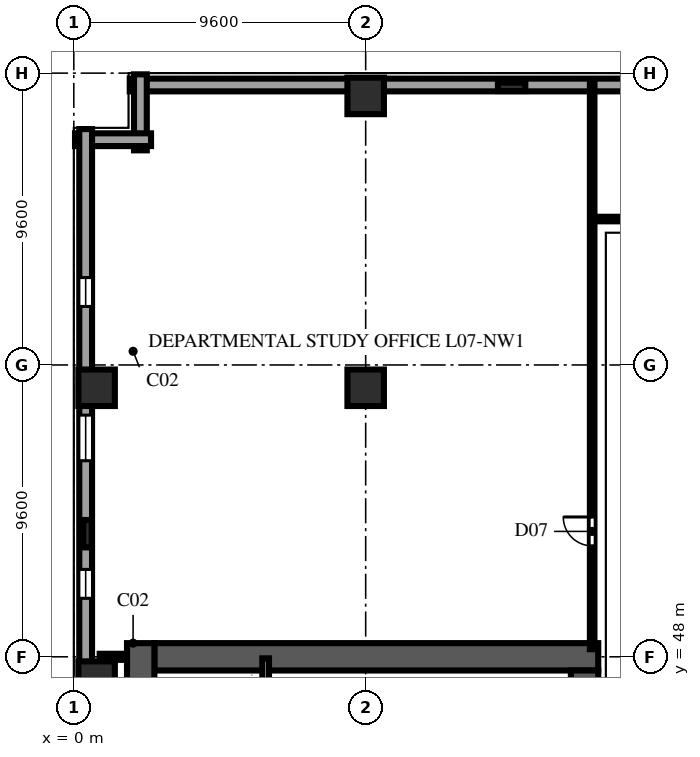
"""IFC4 building model, lengths in metres.
Left out: names, types, materials, properties, quantities, classifications, styles, units other than length and angle.
Written with IfcOpenShell. Run it as: python <this file> out.ifc"""

import sys

from ifc_helpers import new_model, si_unit, direction, frame, frame_2d, origin, origin_2d, place, context, subcontext, project, spatial, rectangle, extrude, element, fill, save


model = new_model("IFC4")
c1 = context("Model", 3, precision=1e-05, world=origin(), true_north=direction((0.0, 1.0)))
c2 = subcontext(c1, "Body", "Model", "MODEL_VIEW")
j1 = project(units=[si_unit("LENGTHUNIT", "METRE"), si_unit("PLANEANGLEUNIT", "RADIAN")], contexts=[c1])
p1 = place(None, origin())
s1 = spatial("IfcSite", under=j1, at=p1, CompositionType="ELEMENT")
p2 = place(p1, origin())
s2 = spatial("IfcBuilding", under=s1, at=p2, CompositionType="ELEMENT")
p3 = place(p2, frame((0.0, 0.0, 31.8)))
s3 = spatial("IfcBuildingStorey", under=s2, at=p3, CompositionType="ELEMENT", Elevation=31.8)
p4 = place(p3, frame((2.65, 48.0, 0.0), z_axis=(0.0, 0.0, 1.0), x_axis=(1.0, 0.0, 0.0)))
e1 = element("IfcWall", 1, at=p4, inside=s3, PredefinedType="SHEAR", context=c2, shape_type="SweptSolid", body=[
    extrude(rectangle(XDim=14.6, YDim=0.9, at=frame_2d((7.3, 0.0))), origin(), (0.0, 0.0, 1.0), 3.54),
])
p5 = place(p3, frame((2.2, 9.15, 0.0), z_axis=(0.0, 0.0, 1.0), x_axis=(0.0, 1.0, 0.0)))
e2 = element("IfcWall", 2, at=p5, inside=s3, PredefinedType="SHEAR", context=c2, shape_type="SweptSolid", body=[
    extrude(rectangle(XDim=39.3, YDim=0.9, at=frame_2d((19.65, 0.0))), origin(), (0.0, 0.0, 1.0), 3.54),
])
p6 = place(p3, frame((16.8, 36.4, 0.0), z_axis=(0.0, 0.0, 1.0), x_axis=(0.0, 1.0, 0.0)))
e3 = element("IfcWall", 3, at=p6, inside=s3, PredefinedType="SHEAR", context=c2, shape_type="SweptSolid", body=[
    extrude(rectangle(XDim=11.15, YDim=0.9, at=frame_2d((5.575, 0.0))), origin(), (0.0, 0.0, 1.0), 3.54),
])
p7 = place(p6, frame((9.2, 0.0, 0.0)))
e4 = element("IfcOpeningElement", 4, at=p7, cuts=e3, PredefinedType="OPENING", context=c2, shape_type="SweptSolid", body=[
    extrude(rectangle(XDim=0.95, YDim=2.15, at=frame_2d((0.475, 1.075))), frame((0.0, 0.462, 0.0), z_axis=(0.0, -1.0, 0.0), x_axis=(1.0, 0.0, 0.0)), (0.0, 0.0, 1.0), 0.924),
])
for number, where, z_axis, x_axis in (
    (5, (0.75, 47.25, 0.0), (0.0, 0.0, 1.0), (1.0, 0.0, 0.0)),
    (6, (0.75, 56.85, 0.0), (0.0, 0.0, 1.0), (1.0, 0.0, 0.0)),
    (7, (9.6, 56.85, 0.0), (0.0, 0.0, 1.0), (1.0, 0.0, 0.0)),
    (8, (9.6, 66.45, 0.0), (0.0, 0.0, 1.0), (1.0, 0.0, 0.0)),
):
    element("IfcColumn", number, at=place(p3, frame(where, z_axis=z_axis, x_axis=x_axis)), inside=s3, PredefinedType="COLUMN", context=c2, shape_type="SweptSolid", body=[
        extrude(rectangle(XDim=1.2, YDim=1.2, at=origin_2d()), origin(), (0.0, 0.0, 1.0), 3.8),
    ])
for number, where, z_axis, x_axis in (
    (9, (0.45, 52.05, 0.0), (0.0, 0.0, 1.0), (0.0, 1.0, 0.0)),
    (10, (14.4, 66.75, 0.0), (0.0, 0.0, 1.0), (1.0, 0.0, 0.0)),
):
    element("IfcColumn", number, at=place(p3, frame(where, z_axis=z_axis, x_axis=x_axis)), inside=s3, PredefinedType="PILASTER", context=c2, shape_type="SweptSolid", body=[
        extrude(rectangle(XDim=0.9, YDim=0.28, at=origin_2d()), origin(), (0.0, 0.0, 1.0), 3.8),
    ])
p8 = place(p3, frame((36.56, 66.81, 0.0), z_axis=(0.0, 0.0, 1.0), x_axis=(-1.0, 0.0, 0.0)))
e11 = element("IfcWall", 11, at=p8, inside=s3, PredefinedType="SOLIDWALL", context=c2, shape_type="SweptSolid", body=[
    extrude(rectangle(XDim=34.72, YDim=0.42, at=frame_2d((17.36, 0.0))), origin(), (0.0, 0.0, 1.0), 3.54),
])
p9 = place(p8, frame((4.885, 0.0, 0.9)))
e12 = element("IfcOpeningElement", 12, at=p9, cuts=e11, PredefinedType="OPENING", context=c2, shape_type="SweptSolid", body=[
    extrude(rectangle(XDim=0.95, YDim=1.85, at=frame_2d((0.475, 0.925))), frame((0.0, 0.222, 0.0), z_axis=(0.0, -1.0, 0.0), x_axis=(1.0, 0.0, 0.0)), (0.0, 0.0, 1.0), 0.444),
])
p10 = place(p8, frame((9.41, 0.0, 0.9)))
e13 = element("IfcOpeningElement", 13, at=p10, cuts=e11, PredefinedType="OPENING", context=c2, shape_type="SweptSolid", body=[
    extrude(rectangle(XDim=1.5, YDim=1.85, at=frame_2d((0.75, 0.925))), frame((0.0, 0.222, 0.0), z_axis=(0.0, -1.0, 0.0), x_axis=(1.0, 0.0, 0.0)), (0.0, 0.0, 1.0), 0.444),
])
p11 = place(p8, frame((14.485, 0.0, 0.9)))
e14 = element("IfcOpeningElement", 14, at=p11, cuts=e11, PredefinedType="OPENING", context=c2, shape_type="SweptSolid", body=[
    extrude(rectangle(XDim=0.95, YDim=1.85, at=frame_2d((0.475, 0.925))), frame((0.0, 0.222, 0.0), z_axis=(0.0, -1.0, 0.0), x_axis=(1.0, 0.0, 0.0)), (0.0, 0.0, 1.0), 0.444),
])
for number, where, z_axis, x_axis in (
    (15, (2.19, 67.16, 0.0), (0.0, 0.0, 1.0), (0.0, -1.0, 0.0)),
    (16, (2.54, 65.01, 0.0), (0.0, 0.0, 1.0), (-1.0, 0.0, 0.0)),
):
    element("IfcWall", number, at=place(p3, frame(where, z_axis=z_axis, x_axis=x_axis)), inside=s3, PredefinedType="SOLIDWALL", context=c2, shape_type="SweptSolid", body=[
        extrude(rectangle(XDim=2.5, YDim=0.42, at=frame_2d((1.25, 0.0))), origin(), (0.0, 0.0, 1.0), 3.54),
    ])
p12 = place(p3, frame((0.39, 65.36, 0.0), z_axis=(0.0, 0.0, 1.0), x_axis=(0.0, -1.0, 0.0)))
e17 = element("IfcWall", 17, at=p12, inside=s3, PredefinedType="SOLIDWALL", context=c2, shape_type="SweptSolid", body=[
    extrude(rectangle(XDim=63.52, YDim=0.42, at=frame_2d((31.76, 0.0))), origin(), (0.0, 0.0, 1.0), 3.54),
])
p13 = place(p12, frame((4.885, 0.0, 0.9)))
e18 = element("IfcOpeningElement", 18, at=p13, cuts=e17, PredefinedType="OPENING", context=c2, shape_type="SweptSolid", body=[
    extrude(rectangle(XDim=0.95, YDim=1.85, at=frame_2d((0.475, 0.925))), frame((0.0, 0.222, 0.0), z_axis=(0.0, -1.0, 0.0), x_axis=(1.0, 0.0, 0.0)), (0.0, 0.0, 1.0), 0.444),
])
p14 = place(p12, frame((9.41, 0.0, 0.9)))
e19 = element("IfcOpeningElement", 19, at=p14, cuts=e17, PredefinedType="OPENING", context=c2, shape_type="SweptSolid", body=[
    extrude(rectangle(XDim=1.5, YDim=1.85, at=frame_2d((0.75, 0.925))), frame((0.0, 0.222, 0.0), z_axis=(0.0, -1.0, 0.0), x_axis=(1.0, 0.0, 0.0)), (0.0, 0.0, 1.0), 0.444),
])
p15 = place(p12, frame((14.485, 0.0, 0.9)))
e20 = element("IfcOpeningElement", 20, at=p15, cuts=e17, PredefinedType="OPENING", context=c2, shape_type="SweptSolid", body=[
    extrude(rectangle(XDim=0.95, YDim=1.85, at=frame_2d((0.475, 0.925))), frame((0.0, 0.222, 0.0), z_axis=(0.0, -1.0, 0.0), x_axis=(1.0, 0.0, 0.0)), (0.0, 0.0, 1.0), 0.444),
])
p16 = place(p12, frame((19.01, 0.0, 0.9)))
e21 = element("IfcOpeningElement", 21, at=p16, cuts=e17, PredefinedType="OPENING", context=c2, shape_type="SweptSolid", body=[
    extrude(rectangle(XDim=1.5, YDim=1.85, at=frame_2d((0.75, 0.925))), frame((0.0, 0.222, 0.0), z_axis=(0.0, -1.0, 0.0), x_axis=(1.0, 0.0, 0.0)), (0.0, 0.0, 1.0), 0.444),
])
p17 = place(p12, frame((24.085, 0.0, 0.9)))
e22 = element("IfcOpeningElement", 22, at=p17, cuts=e17, PredefinedType="OPENING", context=c2, shape_type="SweptSolid", body=[
    extrude(rectangle(XDim=0.95, YDim=1.85, at=frame_2d((0.475, 0.925))), frame((0.0, 0.222, 0.0), z_axis=(0.0, -1.0, 0.0), x_axis=(1.0, 0.0, 0.0)), (0.0, 0.0, 1.0), 0.444),
])
p18 = place(p12, frame((28.61, 0.0, 0.9)))
e23 = element("IfcOpeningElement", 23, at=p18, cuts=e17, PredefinedType="OPENING", context=c2, shape_type="SweptSolid", body=[
    extrude(rectangle(XDim=1.5, YDim=1.85, at=frame_2d((0.75, 0.925))), frame((0.0, 0.222, 0.0), z_axis=(0.0, -1.0, 0.0), x_axis=(1.0, 0.0, 0.0)), (0.0, 0.0, 1.0), 0.444),
])
p19 = place(p12, frame((33.685, 0.0, 0.9)))
e24 = element("IfcOpeningElement", 24, at=p19, cuts=e17, PredefinedType="OPENING", context=c2, shape_type="SweptSolid", body=[
    extrude(rectangle(XDim=0.95, YDim=1.85, at=frame_2d((0.475, 0.925))), frame((0.0, 0.222, 0.0), z_axis=(0.0, -1.0, 0.0), x_axis=(1.0, 0.0, 0.0)), (0.0, 0.0, 1.0), 0.444),
])
p20 = place(p12, frame((38.21, 0.0, 0.9)))
e25 = element("IfcOpeningElement", 25, at=p20, cuts=e17, PredefinedType="OPENING", context=c2, shape_type="SweptSolid", body=[
    extrude(rectangle(XDim=1.5, YDim=1.85, at=frame_2d((0.75, 0.925))), frame((0.0, 0.222, 0.0), z_axis=(0.0, -1.0, 0.0), x_axis=(1.0, 0.0, 0.0)), (0.0, 0.0, 1.0), 0.444),
])
p21 = place(p12, frame((43.285, 0.0, 0.9)))
e26 = element("IfcOpeningElement", 26, at=p21, cuts=e17, PredefinedType="OPENING", context=c2, shape_type="SweptSolid", body=[
    extrude(rectangle(XDim=0.95, YDim=1.85, at=frame_2d((0.475, 0.925))), frame((0.0, 0.222, 0.0), z_axis=(0.0, -1.0, 0.0), x_axis=(1.0, 0.0, 0.0)), (0.0, 0.0, 1.0), 0.444),
])
p22 = place(p12, frame((47.81, 0.0, 0.9)))
e27 = element("IfcOpeningElement", 27, at=p22, cuts=e17, PredefinedType="OPENING", context=c2, shape_type="SweptSolid", body=[
    extrude(rectangle(XDim=1.5, YDim=1.85, at=frame_2d((0.75, 0.925))), frame((0.0, 0.222, 0.0), z_axis=(0.0, -1.0, 0.0), x_axis=(1.0, 0.0, 0.0)), (0.0, 0.0, 1.0), 0.444),
])
p23 = place(p12, frame((52.885, 0.0, 0.9)))
e28 = element("IfcOpeningElement", 28, at=p23, cuts=e17, PredefinedType="OPENING", context=c2, shape_type="SweptSolid", body=[
    extrude(rectangle(XDim=0.95, YDim=1.85, at=frame_2d((0.475, 0.925))), frame((0.0, 0.222, 0.0), z_axis=(0.0, -1.0, 0.0), x_axis=(1.0, 0.0, 0.0)), (0.0, 0.0, 1.0), 0.444),
])
p24 = place(p3, frame((6.31, 40.14, 0.0), z_axis=(0.0, 0.0, 1.0), x_axis=(0.0, 1.0, 0.0)))
e29 = element("IfcWall", 29, at=p24, inside=s3, PredefinedType="SOLIDWALL", context=c2, shape_type="SweptSolid", body=[
    extrude(rectangle(XDim=7.81, YDim=0.22, at=frame_2d((3.905, 0.0))), origin(), (0.0, 0.0, 1.0), 3.54),
])
p25 = place(p3, frame((0.85, 48.0, 0.0), z_axis=(0.0, 0.0, 1.0), x_axis=(1.0, 0.0, 0.0)))
e30 = element("IfcWall", 30, at=p25, inside=s3, PredefinedType="SOLIDWALL", context=c2, shape_type="SweptSolid", body=[
    extrude(rectangle(XDim=0.895, YDim=0.2, at=frame_2d((0.448, 0.0))), origin(), (0.0, 0.0, 1.0), 3.54),
])
p26 = place(p3, frame((17.05, 62.4, 0.0), z_axis=(0.0, 0.0, 1.0), x_axis=(1.0, 0.0, 0.0)))
e31 = element("IfcWall", 31, at=p26, inside=s3, PredefinedType="PARTITIONING", context=c2, shape_type="SweptSolid", body=[
    extrude(rectangle(XDim=2.15, YDim=0.15, at=frame_2d((1.075, 0.0))), origin(), (0.0, 0.0, 1.0), 3.54),
])
p27 = place(p3, frame((17.05, 48.25, 0.0), z_axis=(0.0, 0.0, 1.0), x_axis=(0.0, 1.0, 0.0)))
e32 = element("IfcWall", 32, at=p27, inside=s3, PredefinedType="PARTITIONING", context=c2, shape_type="SweptSolid", body=[
    extrude(rectangle(XDim=18.73, YDim=0.15, at=frame_2d((9.365, 0.0))), origin(), (0.0, 0.0, 1.0), 3.54),
])
p28 = place(p27, frame((3.4, 0.0, 0.0)))
e33 = element("IfcOpeningElement", 33, at=p28, cuts=e32, PredefinedType="OPENING", context=c2, shape_type="SweptSolid", body=[
    extrude(rectangle(XDim=0.95, YDim=2.15, at=frame_2d((0.475, 1.075))), frame((0.0, 0.087, 0.0), z_axis=(0.0, -1.0, 0.0), x_axis=(1.0, 0.0, 0.0)), (0.0, 0.0, 1.0), 0.174),
])
p29 = place(p13, origin())
e34 = element("IfcWindow", 34, at=p29, inside=s3, PartitioningType="SINGLE_PANEL", PredefinedType="WINDOW", context=c2, shape_type="SweptSolid", body=[
    extrude(rectangle(XDim=0.95, YDim=1.85, at=frame_2d((0.475, 0.925))), frame((0.0, 0.11, 0.0), z_axis=(0.0, -1.0, 0.0), x_axis=(1.0, 0.0, 0.0)), (0.0, 0.0, 1.0), 0.06),
])
fill(e18, e34)
p30 = place(p14, origin())
e35 = element("IfcWindow", 35, at=p30, inside=s3, PartitioningType="DOUBLE_PANEL_VERTICAL", PredefinedType="WINDOW", context=c2, shape_type="SweptSolid", body=[
    extrude(rectangle(XDim=1.5, YDim=1.85, at=frame_2d((0.75, 0.925))), frame((0.0, 0.11, 0.0), z_axis=(0.0, -1.0, 0.0), x_axis=(1.0, 0.0, 0.0)), (0.0, 0.0, 1.0), 0.06),
])
fill(e19, e35)
p31 = place(p15, origin())
e36 = element("IfcWindow", 36, at=p31, inside=s3, PartitioningType="SINGLE_PANEL", PredefinedType="WINDOW", context=c2, shape_type="SweptSolid", body=[
    extrude(rectangle(XDim=0.95, YDim=1.85, at=frame_2d((0.475, 0.925))), frame((0.0, 0.11, 0.0), z_axis=(0.0, -1.0, 0.0), x_axis=(1.0, 0.0, 0.0)), (0.0, 0.0, 1.0), 0.06),
])
fill(e20, e36)
p32 = place(p28, origin())
e37 = element("IfcDoor", 37, at=p32, inside=s3, OperationType="SINGLE_SWING_RIGHT", PredefinedType="DOOR", context=c2, shape_type="SweptSolid", body=[
    extrude(rectangle(XDim=0.95, YDim=2.15, at=frame_2d((0.475, 1.075))), frame((0.0, 0.025, 0.0), z_axis=(0.0, -1.0, 0.0), x_axis=(1.0, 0.0, 0.0)), (0.0, 0.0, 1.0), 0.05),
])
fill(e33, e37)
save(model, sys.argv[1])
